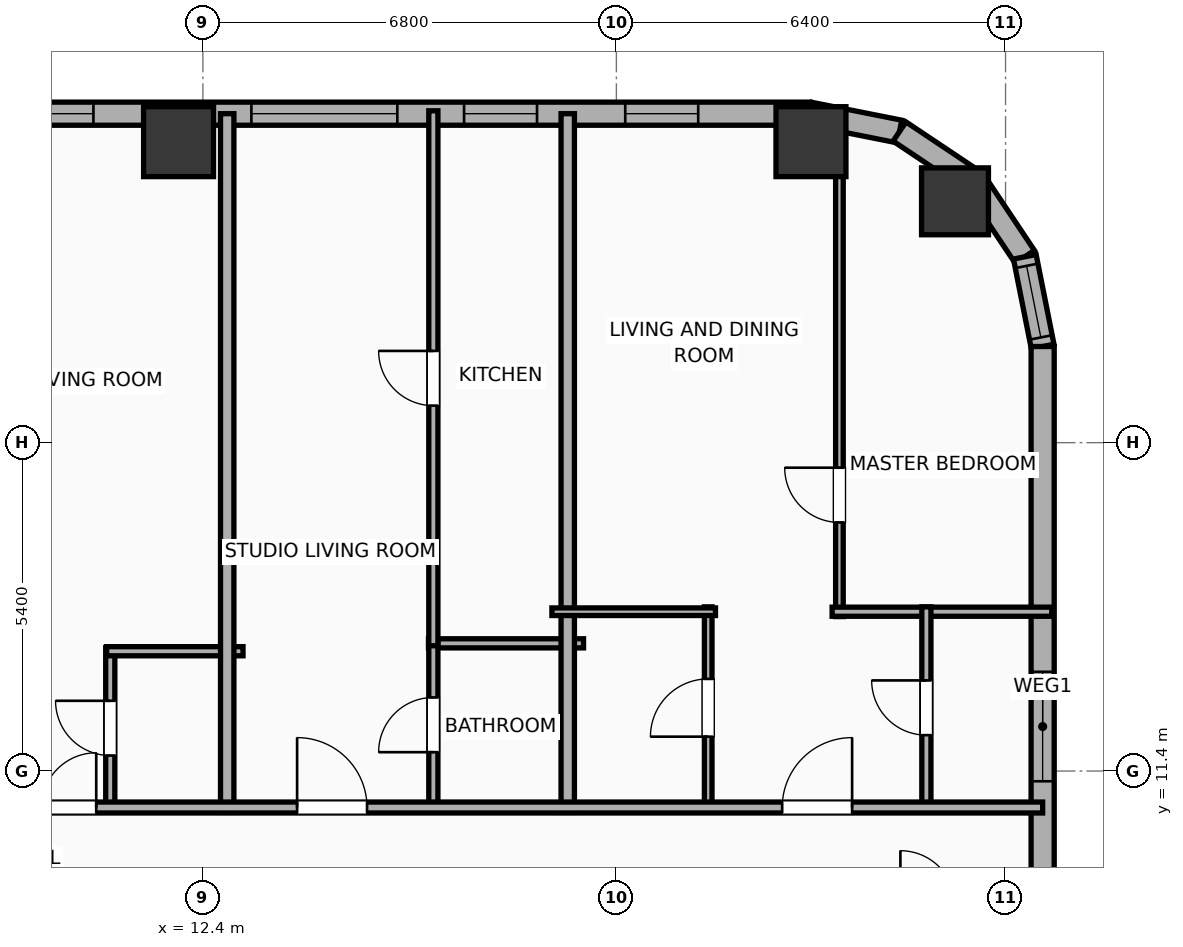
"""IFC4 building model, lengths in metres.
Left out: names, types, materials, properties, quantities, classifications, styles, units other than length and angle.
Written with IfcOpenShell. Run it as: python <this file> out.ifc"""

import sys

from ifc_helpers import new_model, si_unit, direction, frame, frame_2d, origin, origin_2d, place, context, subcontext, project, spatial, rectangle, hollow_rectangle, hollow_circle, extrude, element, fill, save


model = new_model("IFC4")
c1 = context("Model", 3, precision=1e-05, world=origin(), true_north=direction((0.0, 1.0)))
c2 = subcontext(c1, "Body", "Model", "MODEL_VIEW")
j1 = project(units=[si_unit("LENGTHUNIT", "METRE"), si_unit("PLANEANGLEUNIT", "RADIAN")], contexts=[c1])
p1 = place(None, origin())
s1 = spatial("IfcSite", under=j1, at=p1, CompositionType="ELEMENT")
p2 = place(p1, origin())
s2 = spatial("IfcBuilding", under=s1, at=p2, CompositionType="ELEMENT")
p3 = place(p2, frame((0.0, 0.0, 61.1)))
s3 = spatial("IfcBuildingStorey", under=s2, at=p3, CompositionType="ELEMENT", Elevation=61.1)
p4 = place(p3, frame((24.769, 20.769, 0.0), z_axis=(0.0, 0.0, 1.0), x_axis=(1.0, 0.0, 0.0)))
e1 = element("IfcColumn", 1, at=p4, inside=s3, PredefinedType="COLUMN", context=c2, shape_type="SweptSolid", body=[
    extrude(hollow_circle(Radius=0.55, WallThickness=0.036, at=origin_2d()), origin(), (0.0, 0.0, 1.0), 3.9),
])
for number, where, z_axis, x_axis in (
    (2, (22.4, 21.75, 0.0), (0.0, 0.0, 1.0), (1.0, 0.0, 0.0)),
    (3, (12.0, 21.75, 0.0), (0.0, 0.0, 1.0), (1.0, 0.0, 0.0)),
):
    element("IfcColumn", number, at=place(p3, frame(where, z_axis=z_axis, x_axis=x_axis)), inside=s3, PredefinedType="COLUMN", context=c2, shape_type="SweptSolid", body=[
        extrude(hollow_rectangle(XDim=1.15, YDim=1.15, WallThickness=0.04, at=origin_2d()), origin(), (0.0, 0.0, 1.0), 3.9),
    ])
p5 = place(p3, frame((4.714, 22.21, 0.0), z_axis=(0.0, 0.0, 1.0), x_axis=(1.0, 0.0, 0.0)))
e4 = element("IfcWall", 4, at=p5, inside=s3, PredefinedType="ELEMENTEDWALL", context=c2, shape_type="SweptSolid", body=[
    extrude(rectangle(XDim=17.667, YDim=0.38, at=frame_2d((8.833, 0.0))), origin(), (0.0, 0.0, 1.0), 3.65),
])
p6 = place(p5, frame((8.484, 0.0, 0.75)))
e5 = element("IfcOpeningElement", 5, at=p6, cuts=e4, PredefinedType="OPENING", context=c2, shape_type="SweptSolid", body=[
    extrude(rectangle(XDim=2.4, YDim=2.1, at=frame_2d((1.2, 1.05))), frame((0.0, 0.2, 0.0), z_axis=(0.0, -1.0, 0.0), x_axis=(1.0, 0.0, 0.0)), (0.0, 0.0, 1.0), 0.4),
])
p7 = place(p5, frame((1.088, 0.0, 0.75)))
e6 = element("IfcOpeningElement", 6, at=p7, cuts=e4, PredefinedType="OPENING", context=c2, shape_type="SweptSolid", body=[
    extrude(rectangle(XDim=1.2, YDim=2.05, at=frame_2d((0.6, 1.025))), frame((0.0, 0.2, 0.0), z_axis=(0.0, -1.0, 0.0), x_axis=(1.0, 0.0, 0.0)), (0.0, 0.0, 1.0), 0.4),
])
p8 = place(p5, frame((4.686, 0.0, 0.75)))
e7 = element("IfcOpeningElement", 7, at=p8, cuts=e4, PredefinedType="OPENING", context=c2, shape_type="SweptSolid", body=[
    extrude(rectangle(XDim=1.2, YDim=2.05, at=frame_2d((0.6, 1.025))), frame((0.0, 0.2, 0.0), z_axis=(0.0, -1.0, 0.0), x_axis=(1.0, 0.0, 0.0)), (0.0, 0.0, 1.0), 0.4),
])
p9 = place(p5, frame((11.981, 0.0, 0.75)))
e8 = element("IfcOpeningElement", 8, at=p9, cuts=e4, PredefinedType="OPENING", context=c2, shape_type="SweptSolid", body=[
    extrude(rectangle(XDim=1.2, YDim=2.05, at=frame_2d((0.6, 1.025))), frame((0.0, 0.2, 0.0), z_axis=(0.0, -1.0, 0.0), x_axis=(1.0, 0.0, 0.0)), (0.0, 0.0, 1.0), 0.4),
])
p10 = place(p5, frame((14.632, 0.0, 0.75)))
e9 = element("IfcOpeningElement", 9, at=p10, cuts=e4, PredefinedType="OPENING", context=c2, shape_type="SweptSolid", body=[
    extrude(rectangle(XDim=1.2, YDim=2.05, at=frame_2d((0.6, 1.025))), frame((0.0, 0.2, 0.0), z_axis=(0.0, -1.0, 0.0), x_axis=(1.0, 0.0, 0.0)), (0.0, 0.0, 1.0), 0.4),
])
p11 = place(p3, frame((22.381, 22.21, 0.0), z_axis=(0.0, 0.0, 1.0), x_axis=(0.980786132421, -0.195086038585, 0.0)))
e10 = element("IfcWall", 10, at=p11, inside=s3, PredefinedType="ELEMENTEDWALL", context=c2, shape_type="SweptSolid", body=[
    extrude(rectangle(XDim=1.504, YDim=0.38, at=frame_2d((0.752, 0.0))), origin(), (0.0, 0.0, 1.0), 3.65),
])
for number, where, z_axis, x_axis in (
    (11, (23.857, 21.917, 0.0), (0.0, 0.0, 1.0), (0.831, -0.556, 0.0)),
    (12, (25.091, 21.091, 0.0), (0.0, 0.0, 1.0), (0.556, -0.831, 0.0)),
):
    element("IfcWall", number, at=place(p3, frame(where, z_axis=z_axis, x_axis=x_axis)), inside=s3, PredefinedType="ELEMENTEDWALL", context=c2, shape_type="SweptSolid", body=[
        extrude(rectangle(XDim=1.485, YDim=0.38, at=frame_2d((0.743, 0.0))), origin(), (0.0, 0.0, 1.0), 3.65),
    ])
p12 = place(p3, frame((25.917, 19.857, 0.0), z_axis=(0.0, 0.0, 1.0), x_axis=(0.195086038585, -0.980786132421, 0.0)))
e13 = element("IfcWall", 13, at=p12, inside=s3, PredefinedType="ELEMENTEDWALL", context=c2, shape_type="SweptSolid", body=[
    extrude(rectangle(XDim=1.504, YDim=0.38, at=frame_2d((0.752, 0.0))), origin(), (0.0, 0.0, 1.0), 3.65),
])
p13 = place(p12, frame((0.152, 0.0, 0.75)))
e14 = element("IfcOpeningElement", 14, at=p13, cuts=e13, PredefinedType="OPENING", context=c2, shape_type="SweptSolid", body=[
    extrude(rectangle(XDim=1.2, YDim=2.05, at=frame_2d((0.6, 1.025))), frame((0.0, 0.2, 0.0), z_axis=(0.0, -1.0, 0.0), x_axis=(1.0, 0.0, 0.0)), (0.0, 0.0, 1.0), 0.4),
])
p14 = place(p3, frame((26.21, 18.381, 0.0), z_axis=(0.0, 0.0, 1.0), x_axis=(0.0, -1.0, 0.0)))
e15 = element("IfcWall", 15, at=p14, inside=s3, PredefinedType="ELEMENTEDWALL", context=c2, shape_type="SweptSolid", body=[
    extrude(rectangle(XDim=12.499, YDim=0.38, at=frame_2d((6.25, 0.0))), origin(), (0.0, 0.0, 1.0), 3.65),
])
p15 = place(p14, frame((5.35, 0.0, 0.75)))
e16 = element("IfcOpeningElement", 16, at=p15, cuts=e15, PredefinedType="OPENING", context=c2, shape_type="SweptSolid", body=[
    extrude(rectangle(XDim=1.8, YDim=2.1, at=frame_2d((0.9, 1.05))), frame((0.0, 0.2, 0.0), z_axis=(0.0, -1.0, 0.0), x_axis=(1.0, 0.0, 0.0)), (0.0, 0.0, 1.0), 0.4),
])
p16 = place(p3, frame((10.877, 10.78, 0.0), z_axis=(0.0, 0.0, 1.0), x_axis=(0.0, 1.0, 0.0)))
e17 = element("IfcWall", 17, at=p16, inside=s3, PredefinedType="PLUMBINGWALL", context=c2, shape_type="SweptSolid", body=[
    extrude(rectangle(XDim=2.65, YDim=0.15, at=frame_2d((1.325, 0.0))), origin(), (0.0, 0.0, 1.0), 3.65),
])
p17 = place(p16, frame((0.875, 0.0, 0.0)))
e18 = element("IfcOpeningElement", 18, at=p17, cuts=e17, PredefinedType="OPENING", context=c2, shape_type="SweptSolid", body=[
    extrude(rectangle(XDim=0.9, YDim=2.05, at=frame_2d((0.45, 1.025))), frame((0.0, 0.085, 0.0), z_axis=(0.0, -1.0, 0.0), x_axis=(1.0, 0.0, 0.0)), (0.0, 0.0, 1.0), 0.17),
])
p18 = place(p3, frame((10.817, 13.37, 0.0), z_axis=(0.0, 0.0, 1.0), x_axis=(1.0, 0.0, 0.0)))
e19 = element("IfcWall", 19, at=p18, inside=s3, PredefinedType="PLUMBINGWALL", context=c2, shape_type="SweptSolid", body=[
    extrude(rectangle(XDim=2.243, YDim=0.15, at=frame_2d((1.122, 0.0))), origin(), (0.0, 0.0, 1.0), 3.65),
])
p19 = place(p3, frame((12.8, 10.72, 0.0), z_axis=(0.0, 0.0, 1.0), x_axis=(0.0, 1.0, 0.0)))
e20 = element("IfcWall", 20, at=p19, inside=s3, PredefinedType="PARTITIONING", context=c2, shape_type="SweptSolid", body=[
    extrude(rectangle(XDim=11.49, YDim=0.22, at=frame_2d((5.745, 0.0))), origin(), (0.0, 0.0, 1.0), 3.65),
])
p20 = place(p3, frame((16.11, 13.5, 0.0), z_axis=(0.0, 0.0, 1.0), x_axis=(1.0, 0.0, 0.0)))
e21 = element("IfcWall", 21, at=p20, inside=s3, PredefinedType="PLUMBINGWALL", context=c2, shape_type="SweptSolid", body=[
    extrude(rectangle(XDim=2.55, YDim=0.15, at=frame_2d((1.275, 0.0))), origin(), (0.0, 0.0, 1.0), 3.65),
])
p21 = place(p3, frame((16.19, 10.78, 0.0), z_axis=(0.0, 0.0, 1.0), x_axis=(0.0, 1.0, 0.0)))
e22 = element("IfcWall", 22, at=p21, inside=s3, PredefinedType="PLUMBINGWALL", context=c2, shape_type="SweptSolid", body=[
    extrude(rectangle(XDim=2.76, YDim=0.15, at=frame_2d((1.38, 0.0))), origin(), (0.0, 0.0, 1.0), 3.65),
])
p22 = place(p21, frame((0.93, 0.0, 0.0)))
e23 = element("IfcOpeningElement", 23, at=p22, cuts=e22, PredefinedType="OPENING", context=c2, shape_type="SweptSolid", body=[
    extrude(rectangle(XDim=0.9, YDim=2.05, at=frame_2d((0.45, 1.025))), frame((0.0, 0.085, 0.0), z_axis=(0.0, -1.0, 0.0), x_axis=(1.0, 0.0, 0.0)), (0.0, 0.0, 1.0), 0.17),
])
p23 = place(p3, frame((16.19, 13.46, 0.0), z_axis=(0.0, 0.0, 1.0), x_axis=(0.0, 1.0, 0.0)))
e24 = element("IfcWall", 24, at=p23, inside=s3, PredefinedType="PLUMBINGWALL", context=c2, shape_type="SweptSolid", body=[
    extrude(rectangle(XDim=8.798, YDim=0.15, at=frame_2d((4.399, 0.0))), origin(), (0.0, 0.0, 1.0), 3.65),
])
p24 = place(p23, frame((3.949, 0.0, 0.0)))
e25 = element("IfcOpeningElement", 25, at=p24, cuts=e24, PredefinedType="OPENING", context=c2, shape_type="SweptSolid", body=[
    extrude(rectangle(XDim=0.9, YDim=2.05, at=frame_2d((0.45, 1.025))), frame((0.0, 0.085, 0.0), z_axis=(0.0, -1.0, 0.0), x_axis=(1.0, 0.0, 0.0)), (0.0, 0.0, 1.0), 0.17),
])
p25 = place(p3, frame((18.4, 10.72, 0.0), z_axis=(0.0, 0.0, 1.0), x_axis=(0.0, 1.0, 0.0)))
e26 = element("IfcWall", 26, at=p25, inside=s3, PredefinedType="PARTITIONING", context=c2, shape_type="SweptSolid", body=[
    extrude(rectangle(XDim=11.49, YDim=0.22, at=frame_2d((5.745, 0.0))), origin(), (0.0, 0.0, 1.0), 3.65),
])
p26 = place(p3, frame((22.868, 13.94, 0.0), z_axis=(0.0, 0.0, 1.0), x_axis=(0.0, 1.0, 0.0)))
e27 = element("IfcWall", 27, at=p26, inside=s3, PredefinedType="PARTITIONING", context=c2, shape_type="SweptSolid", body=[
    extrude(rectangle(XDim=8.326, YDim=0.125, at=frame_2d((4.163, 0.0))), origin(), (0.0, 0.0, 1.0), 2.94),
])
p27 = place(p26, frame((1.548, 0.0, 0.0)))
e28 = element("IfcOpeningElement", 28, at=p27, cuts=e27, PredefinedType="OPENING", context=c2, shape_type="SweptSolid", body=[
    extrude(rectangle(XDim=0.9, YDim=2.05, at=frame_2d((0.45, 1.025))), frame((0.0, 0.073, 0.0), z_axis=(0.0, -1.0, 0.0), x_axis=(1.0, 0.0, 0.0)), (0.0, 0.0, 1.0), 0.145),
])
p28 = place(p3, frame((22.748, 14.02, 0.0), z_axis=(0.0, 0.0, 1.0), x_axis=(1.0, 0.0, 0.0)))
e29 = element("IfcWall", 29, at=p28, inside=s3, PredefinedType="PLUMBINGWALL", context=c2, shape_type="SweptSolid", body=[
    extrude(rectangle(XDim=3.612, YDim=0.15, at=frame_2d((1.806, 0.0))), origin(), (0.0, 0.0, 1.0), 3.65),
])
p29 = place(p3, frame((20.71, 10.78, 0.0), z_axis=(0.0, 0.0, 1.0), x_axis=(0.0, 1.0, 0.0)))
e30 = element("IfcWall", 30, at=p29, inside=s3, PredefinedType="PARTITIONING", context=c2, shape_type="SweptSolid", body=[
    extrude(rectangle(XDim=3.32, YDim=0.125, at=frame_2d((1.66, 0.0))), origin(), (0.0, 0.0, 1.0), 2.94),
])
p30 = place(p29, frame((1.185, 0.0, 0.0)))
e31 = element("IfcOpeningElement", 31, at=p30, cuts=e30, PredefinedType="OPENING", context=c2, shape_type="SweptSolid", body=[
    extrude(rectangle(XDim=0.95, YDim=2.05, at=frame_2d((0.475, 1.025))), frame((0.0, 0.073, 0.0), z_axis=(0.0, -1.0, 0.0), x_axis=(1.0, 0.0, 0.0)), (0.0, 0.0, 1.0), 0.145),
])
p31 = place(p3, frame((18.14, 14.02, 0.0), z_axis=(0.0, 0.0, 1.0), x_axis=(1.0, 0.0, 0.0)))
e32 = element("IfcWall", 32, at=p31, inside=s3, PredefinedType="PARTITIONING", context=c2, shape_type="SweptSolid", body=[
    extrude(rectangle(XDim=2.69, YDim=0.125, at=frame_2d((1.345, 0.0))), origin(), (0.0, 0.0, 1.0), 3.65),
])
p32 = place(p3, frame((24.298, 10.78, 0.0), z_axis=(0.0, 0.0, 1.0), x_axis=(0.0, 1.0, 0.0)))
e33 = element("IfcWall", 33, at=p32, inside=s3, PredefinedType="PLUMBINGWALL", context=c2, shape_type="SweptSolid", body=[
    extrude(rectangle(XDim=3.32, YDim=0.15, at=frame_2d((1.66, 0.0))), origin(), (0.0, 0.0, 1.0), 3.65),
])
p33 = place(p32, frame((1.21, 0.0, 0.0)))
e34 = element("IfcOpeningElement", 34, at=p33, cuts=e33, PredefinedType="OPENING", context=c2, shape_type="SweptSolid", body=[
    extrude(rectangle(XDim=0.9, YDim=2.05, at=frame_2d((0.45, 1.025))), frame((0.0, 0.085, 0.0), z_axis=(0.0, -1.0, 0.0), x_axis=(1.0, 0.0, 0.0)), (0.0, 0.0, 1.0), 0.17),
])
p34 = place(p3, frame((-33.41, 10.8, 0.0), z_axis=(0.0, 0.0, 1.0), x_axis=(1.0, 0.0, 0.0)))
e35 = element("IfcWall", 35, at=p34, inside=s3, PredefinedType="PARTITIONING", context=c2, shape_type="SweptSolid", body=[
    extrude(rectangle(XDim=59.62, YDim=0.18, at=frame_2d((29.81, 0.0))), origin(), (0.0, 0.0, 1.0), 3.65),
])
p35 = place(p34, frame((3.062, 0.0, 0.0)))
e36 = element("IfcOpeningElement", 36, at=p35, cuts=e35, PredefinedType="OPENING", context=c2, shape_type="SweptSolid", body=[
    extrude(rectangle(XDim=1.15, YDim=2.05, at=frame_2d((0.575, 1.025))), frame((0.0, 0.1, 0.0), z_axis=(0.0, -1.0, 0.0), x_axis=(1.0, 0.0, 0.0)), (0.0, 0.0, 1.0), 0.2),
])
p36 = place(p34, frame((10.312, 0.0, 0.0)))
e37 = element("IfcOpeningElement", 37, at=p36, cuts=e35, PredefinedType="OPENING", context=c2, shape_type="SweptSolid", body=[
    extrude(rectangle(XDim=1.15, YDim=2.05, at=frame_2d((0.575, 1.025))), frame((0.0, 0.1, 0.0), z_axis=(0.0, -1.0, 0.0), x_axis=(1.0, 0.0, 0.0)), (0.0, 0.0, 1.0), 0.2),
])
p37 = place(p34, frame((15.153, 0.0, 0.0)))
e38 = element("IfcOpeningElement", 38, at=p37, cuts=e35, PredefinedType="OPENING", context=c2, shape_type="SweptSolid", body=[
    extrude(rectangle(XDim=0.9, YDim=2.05, at=frame_2d((0.45, 1.025))), frame((0.0, 0.1, 0.0), z_axis=(0.0, -1.0, 0.0), x_axis=(1.0, 0.0, 0.0)), (0.0, 0.0, 1.0), 0.2),
])
p38 = place(p34, frame((21.508, 0.0, 0.0)))
e39 = element("IfcOpeningElement", 39, at=p38, cuts=e35, PredefinedType="OPENING", context=c2, shape_type="SweptSolid", body=[
    extrude(rectangle(XDim=1.15, YDim=2.05, at=frame_2d((0.575, 1.025))), frame((0.0, 0.1, 0.0), z_axis=(0.0, -1.0, 0.0), x_axis=(1.0, 0.0, 0.0)), (0.0, 0.0, 1.0), 0.2),
])
p39 = place(p34, frame((26.355, 0.0, 0.0)))
e40 = element("IfcOpeningElement", 40, at=p39, cuts=e35, PredefinedType="OPENING", context=c2, shape_type="SweptSolid", body=[
    extrude(rectangle(XDim=0.9, YDim=2.05, at=frame_2d((0.45, 1.025))), frame((0.0, 0.1, 0.0), z_axis=(0.0, -1.0, 0.0), x_axis=(1.0, 0.0, 0.0)), (0.0, 0.0, 1.0), 0.2),
])
p40 = place(p34, frame((32.753, 0.0, 0.0)))
e41 = element("IfcOpeningElement", 41, at=p40, cuts=e35, PredefinedType="OPENING", context=c2, shape_type="SweptSolid", body=[
    extrude(rectangle(XDim=1.15, YDim=2.05, at=frame_2d((0.575, 1.025))), frame((0.0, 0.1, 0.0), z_axis=(0.0, -1.0, 0.0), x_axis=(1.0, 0.0, 0.0)), (0.0, 0.0, 1.0), 0.2),
])
p41 = place(p34, frame((36.163, 0.0, 0.0)))
e42 = element("IfcOpeningElement", 42, at=p41, cuts=e35, PredefinedType="OPENING", context=c2, shape_type="SweptSolid", body=[
    extrude(rectangle(XDim=1.15, YDim=2.05, at=frame_2d((0.575, 1.025))), frame((0.0, 0.1, 0.0), z_axis=(0.0, -1.0, 0.0), x_axis=(1.0, 0.0, 0.0)), (0.0, 0.0, 1.0), 0.2),
])
p42 = place(p34, frame((43.156, 0.0, 0.0)))
e43 = element("IfcOpeningElement", 43, at=p42, cuts=e35, PredefinedType="OPENING", context=c2, shape_type="SweptSolid", body=[
    extrude(rectangle(XDim=0.9, YDim=2.05, at=frame_2d((0.45, 1.025))), frame((0.0, 0.1, 0.0), z_axis=(0.0, -1.0, 0.0), x_axis=(1.0, 0.0, 0.0)), (0.0, 0.0, 1.0), 0.2),
])
p43 = place(p34, frame((47.36, 0.0, 0.0)))
e44 = element("IfcOpeningElement", 44, at=p43, cuts=e35, PredefinedType="OPENING", context=c2, shape_type="SweptSolid", body=[
    extrude(rectangle(XDim=1.15, YDim=2.05, at=frame_2d((0.575, 1.025))), frame((0.0, 0.1, 0.0), z_axis=(0.0, -1.0, 0.0), x_axis=(1.0, 0.0, 0.0)), (0.0, 0.0, 1.0), 0.2),
])
p44 = place(p34, frame((55.337, 0.0, 0.0)))
e45 = element("IfcOpeningElement", 45, at=p44, cuts=e35, PredefinedType="OPENING", context=c2, shape_type="SweptSolid", body=[
    extrude(rectangle(XDim=1.15, YDim=2.05, at=frame_2d((0.575, 1.025))), frame((0.0, 0.1, 0.0), z_axis=(0.0, -1.0, 0.0), x_axis=(1.0, 0.0, 0.0)), (0.0, 0.0, 1.0), 0.2),
])
p45 = place(p6, origin())
e46 = element("IfcWindow", 46, at=p45, inside=s3, PartitioningType="SINGLE_PANEL", PredefinedType="WINDOW", context=c2, shape_type="SweptSolid", body=[
    extrude(rectangle(XDim=2.4, YDim=2.1, at=frame_2d((1.2, 1.05))), frame((0.0, 0.03, 0.0), z_axis=(0.0, -1.0, 0.0), x_axis=(1.0, 0.0, 0.0)), (0.0, 0.0, 1.0), 0.06),
])
fill(e5, e46)
p46 = place(p15, origin())
e47 = element("IfcWindow", 47, at=p46, inside=s3, PartitioningType="SINGLE_PANEL", PredefinedType="WINDOW", context=c2, shape_type="SweptSolid", body=[
    extrude(rectangle(XDim=1.8, YDim=2.1, at=frame_2d((0.9, 1.05))), frame((0.0, 0.03, 0.0), z_axis=(0.0, -1.0, 0.0), x_axis=(1.0, 0.0, 0.0)), (0.0, 0.0, 1.0), 0.06),
])
fill(e16, e47)
p47 = place(p8, origin())
e48 = element("IfcWindow", 48, at=p47, inside=s3, PartitioningType="SINGLE_PANEL", PredefinedType="WINDOW", context=c2, shape_type="SweptSolid", body=[
    extrude(rectangle(XDim=1.2, YDim=2.05, at=frame_2d((0.6, 1.025))), frame((0.0, 0.03, 0.0), z_axis=(0.0, -1.0, 0.0), x_axis=(1.0, 0.0, 0.0)), (0.0, 0.0, 1.0), 0.06),
])
fill(e7, e48)
p48 = place(p9, origin())
e49 = element("IfcWindow", 49, at=p48, inside=s3, PartitioningType="SINGLE_PANEL", PredefinedType="WINDOW", context=c2, shape_type="SweptSolid", body=[
    extrude(rectangle(XDim=1.2, YDim=2.05, at=frame_2d((0.6, 1.025))), frame((0.0, 0.03, 0.0), z_axis=(0.0, -1.0, 0.0), x_axis=(1.0, 0.0, 0.0)), (0.0, 0.0, 1.0), 0.06),
])
fill(e8, e49)
p49 = place(p10, origin())
e50 = element("IfcWindow", 50, at=p49, inside=s3, PartitioningType="SINGLE_PANEL", PredefinedType="WINDOW", context=c2, shape_type="SweptSolid", body=[
    extrude(rectangle(XDim=1.2, YDim=2.05, at=frame_2d((0.6, 1.025))), frame((0.0, 0.03, 0.0), z_axis=(0.0, -1.0, 0.0), x_axis=(1.0, 0.0, 0.0)), (0.0, 0.0, 1.0), 0.06),
])
fill(e9, e50)
p50 = place(p13, origin())
e51 = element("IfcWindow", 51, at=p50, inside=s3, PartitioningType="SINGLE_PANEL", PredefinedType="WINDOW", context=c2, shape_type="SweptSolid", body=[
    extrude(rectangle(XDim=1.2, YDim=2.05, at=frame_2d((0.6, 1.025))), frame((0.0, 0.03, 0.0), z_axis=(0.0, -1.0, 0.0), x_axis=(1.0, 0.0, 0.0)), (0.0, 0.0, 1.0), 0.06),
])
fill(e14, e51)
p51 = place(p17, origin())
e52 = element("IfcDoor", 52, at=p51, inside=s3, OperationType="SINGLE_SWING_RIGHT", PredefinedType="DOOR", context=c2, shape_type="SweptSolid", body=[
    extrude(rectangle(XDim=0.9, YDim=2.05, at=frame_2d((0.45, 1.025))), frame((0.0, 0.025, 0.0), z_axis=(0.0, -1.0, 0.0), x_axis=(1.0, 0.0, 0.0)), (0.0, 0.0, 1.0), 0.05),
])
fill(e18, e52)
p52 = place(p22, origin())
e53 = element("IfcDoor", 53, at=p52, inside=s3, OperationType="SINGLE_SWING_LEFT", PredefinedType="DOOR", context=c2, shape_type="SweptSolid", body=[
    extrude(rectangle(XDim=0.9, YDim=2.05, at=frame_2d((0.45, 1.025))), frame((0.0, 0.025, 0.0), z_axis=(0.0, -1.0, 0.0), x_axis=(1.0, 0.0, 0.0)), (0.0, 0.0, 1.0), 0.05),
])
fill(e23, e53)
p53 = place(p24, origin())
e54 = element("IfcDoor", 54, at=p53, inside=s3, OperationType="SINGLE_SWING_RIGHT", PredefinedType="DOOR", context=c2, shape_type="SweptSolid", body=[
    extrude(rectangle(XDim=0.9, YDim=2.05, at=frame_2d((0.45, 1.025))), frame((0.0, 0.025, 0.0), z_axis=(0.0, -1.0, 0.0), x_axis=(1.0, 0.0, 0.0)), (0.0, 0.0, 1.0), 0.05),
])
fill(e25, e54)
p54 = place(p27, origin())
e55 = element("IfcDoor", 55, at=p54, inside=s3, OperationType="SINGLE_SWING_RIGHT", PredefinedType="DOOR", context=c2, shape_type="SweptSolid", body=[
    extrude(rectangle(XDim=0.9, YDim=2.05, at=frame_2d((0.45, 1.025))), frame((0.0, 0.025, 0.0), z_axis=(0.0, -1.0, 0.0), x_axis=(1.0, 0.0, 0.0)), (0.0, 0.0, 1.0), 0.05),
])
fill(e28, e55)
p55 = place(p30, origin())
e56 = element("IfcDoor", 56, at=p55, inside=s3, OperationType="SINGLE_SWING_LEFT", PredefinedType="DOOR", context=c2, shape_type="SweptSolid", body=[
    extrude(rectangle(XDim=0.95, YDim=2.05, at=frame_2d((0.475, 1.025))), frame((0.0, 0.025, 0.0), z_axis=(0.0, -1.0, 0.0), x_axis=(1.0, 0.0, 0.0)), (0.0, 0.0, 1.0), 0.05),
])
fill(e31, e56)
p56 = place(p33, origin())
e57 = element("IfcDoor", 57, at=p56, inside=s3, OperationType="SINGLE_SWING_RIGHT", PredefinedType="DOOR", context=c2, shape_type="SweptSolid", body=[
    extrude(rectangle(XDim=0.9, YDim=2.05, at=frame_2d((0.45, 1.025))), frame((0.0, 0.025, 0.0), z_axis=(0.0, -1.0, 0.0), x_axis=(1.0, 0.0, 0.0)), (0.0, 0.0, 1.0), 0.05),
])
fill(e34, e57)
p57 = place(p42, origin())
e58 = element("IfcDoor", 58, at=p57, inside=s3, OperationType="SINGLE_SWING_RIGHT", PredefinedType="DOOR", context=c2, shape_type="SweptSolid", body=[
    extrude(rectangle(XDim=0.9, YDim=2.05, at=frame_2d((0.45, 1.025))), frame((0.0, 0.025, 0.0), z_axis=(0.0, -1.0, 0.0), x_axis=(1.0, 0.0, 0.0)), (0.0, 0.0, 1.0), 0.05),
])
fill(e43, e58)
p58 = place(p43, origin())
e59 = element("IfcDoor", 59, at=p58, inside=s3, OperationType="SINGLE_SWING_LEFT", PredefinedType="DOOR", context=c2, shape_type="SweptSolid", body=[
    extrude(rectangle(XDim=1.15, YDim=2.05, at=frame_2d((0.575, 1.025))), frame((0.0, 0.025, 0.0), z_axis=(0.0, -1.0, 0.0), x_axis=(1.0, 0.0, 0.0)), (0.0, 0.0, 1.0), 0.05),
])
fill(e44, e59)
p59 = place(p44, origin())
e60 = element("IfcDoor", 60, at=p59, inside=s3, OperationType="SINGLE_SWING_RIGHT", PredefinedType="DOOR", context=c2, shape_type="SweptSolid", body=[
    extrude(rectangle(XDim=1.15, YDim=2.05, at=frame_2d((0.575, 1.025))), frame((0.0, 0.025, 0.0), z_axis=(0.0, -1.0, 0.0), x_axis=(1.0, 0.0, 0.0)), (0.0, 0.0, 1.0), 0.05),
])
fill(e45, e60)
save(model, sys.argv[1])
